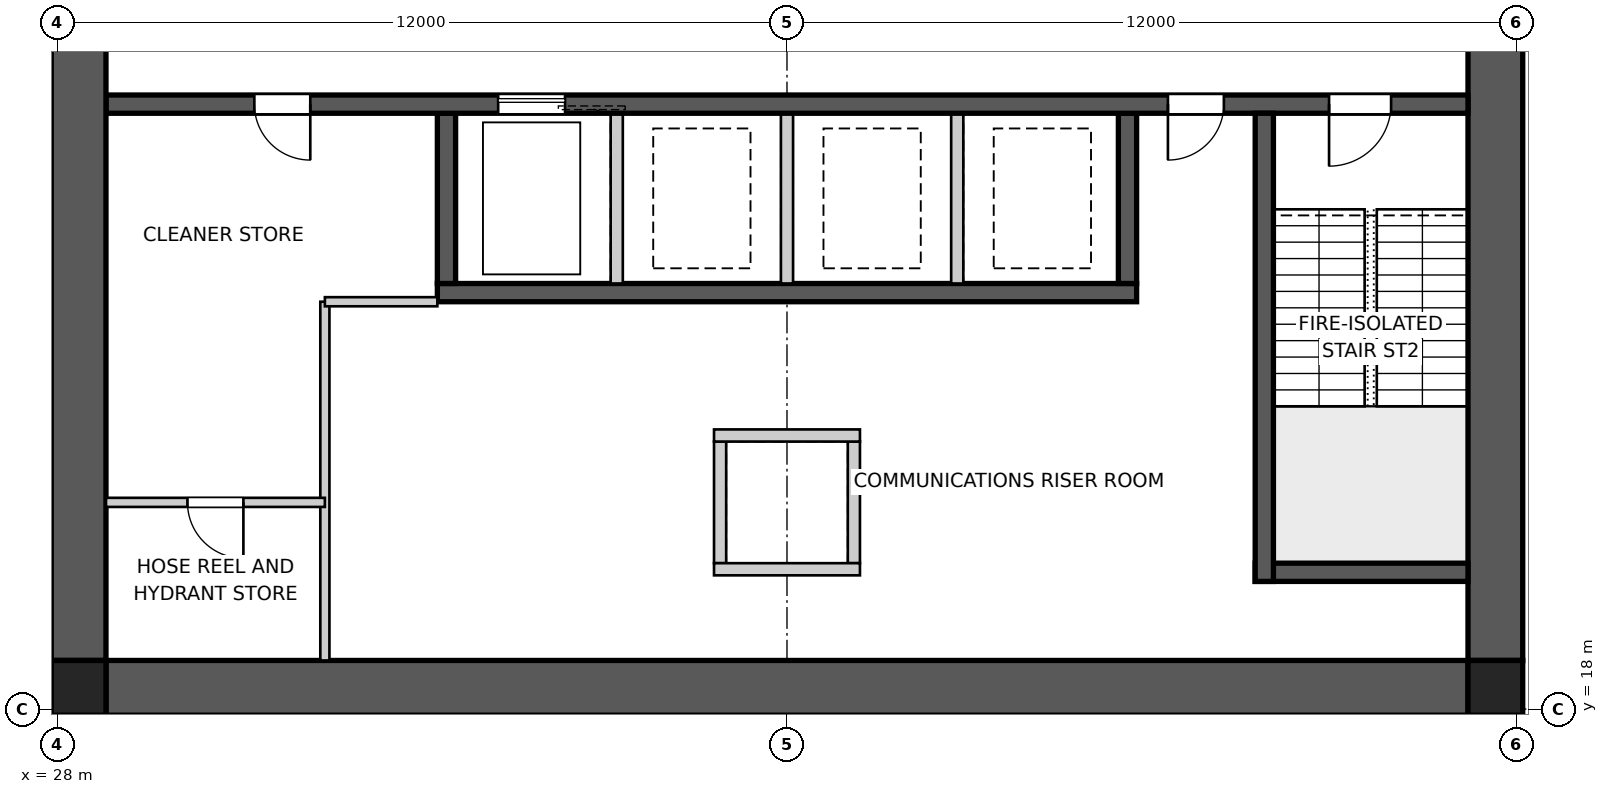
"""IFC4 building model, lengths in metres.
Left out: names, types, materials, properties, quantities, classifications, styles, units other than length and angle.
Written with IfcOpenShell. Run it as: python <this file> out.ifc"""

import sys

from ifc_helpers import new_model, si_unit, direction, frame, frame_2d, origin, origin_2d, place, context, subcontext, project, spatial, polyline, rectangle, outline, extrude, element, fill, save


model = new_model("IFC4")
c1 = context("Model", 3, precision=1e-05, world=origin(), true_north=direction((0.0, 1.0)))
c2 = subcontext(c1, "Body", "Model", "MODEL_VIEW")
j1 = project(units=[si_unit("LENGTHUNIT", "METRE"), si_unit("PLANEANGLEUNIT", "RADIAN")], contexts=[c1])
p1 = place(None, origin())
s1 = spatial("IfcSite", under=j1, at=p1, CompositionType="ELEMENT")
p2 = place(p1, origin())
s2 = spatial("IfcBuilding", under=s1, at=p2, CompositionType="ELEMENT")
p3 = place(p2, frame((0.0, 0.0, 6.0)))
s3 = spatial("IfcBuildingStorey", under=s2, at=p3, CompositionType="ELEMENT", Elevation=6.0)
p4 = place(p3, frame((51.2, 18.35, 0.0), z_axis=(0.0, 0.0, 1.0), x_axis=(-1.0, 0.0, 0.0)))
e1 = element("IfcWall", 1, at=p4, inside=s3, PredefinedType="SHEAR", context=c2, shape_type="SweptSolid", body=[
    extrude(outline(polyline([(0.0, -0.45), (22.4, -0.45), (22.4, -0.025), (22.85, -0.025), (22.85, 0.025), (22.4, 0.025), (22.4, 0.45), (0.0, 0.45), (0.0, 0.025), (-0.45, 0.025), (-0.45, -0.025), (0.0, -0.025), (0.0, -0.45)])), origin(), (0.0, 0.0, 1.0), 4.5),
])
p5 = place(p3, frame((51.65, 18.8, 0.0), z_axis=(0.0, 0.0, 1.0), x_axis=(0.0, 1.0, 0.0)))
e2 = element("IfcWall", 2, at=p5, inside=s3, PredefinedType="SHEAR", context=c2, shape_type="SweptSolid", body=[
    extrude(outline(polyline([(0.0, -0.45), (22.4, -0.45), (22.4, -0.025), (22.85, -0.025), (22.85, 0.025), (22.4, 0.025), (22.4, 0.45), (0.0, 0.45), (0.0, 0.025), (-0.45, 0.025), (-0.45, -0.025), (0.0, -0.025), (0.0, -0.45)])), origin(), (0.0, 0.0, 1.0), 4.5),
])
p6 = place(p5, frame((11.14, 0.0, 0.0)))
e3 = element("IfcOpeningElement", 3, at=p6, cuts=e2, PredefinedType="OPENING", context=c2, shape_type="SweptSolid", body=[
    extrude(rectangle(XDim=1.02, YDim=2.4, at=frame_2d((0.51, 1.2))), frame((0.0, 0.46, 0.0), z_axis=(0.0, -1.0, 0.0), x_axis=(1.0, 0.0, 0.0)), (0.0, 0.0, 1.0), 0.92),
])
p7 = place(p3, frame((28.35, 41.2, 0.0), z_axis=(0.0, 0.0, 1.0), x_axis=(0.0, -1.0, 0.0)))
e4 = element("IfcWall", 4, at=p7, inside=s3, PredefinedType="SHEAR", context=c2, shape_type="SweptSolid", body=[
    extrude(outline(polyline([(0.0, -0.45), (22.4, -0.45), (22.4, -0.025), (22.85, -0.025), (22.85, 0.025), (22.4, 0.025), (22.4, 0.45), (0.0, 0.45), (0.0, 0.025), (-0.45, 0.025), (-0.45, -0.025), (0.0, -0.025), (0.0, -0.45)])), origin(), (0.0, 0.0, 1.0), 4.5),
])
p8 = place(p7, frame((11.14, 0.0, 0.0)))
e5 = element("IfcOpeningElement", 5, at=p8, cuts=e4, PredefinedType="OPENING", context=c2, shape_type="SweptSolid", body=[
    extrude(rectangle(XDim=1.02, YDim=2.4, at=frame_2d((0.51, 1.2))), frame((0.0, 0.46, 0.0), z_axis=(0.0, -1.0, 0.0), x_axis=(1.0, 0.0, 0.0)), (0.0, 0.0, 1.0), 0.92),
])
p9 = place(p3, frame((51.2, 27.95, 0.0), z_axis=(0.0, 0.0, 1.0), x_axis=(-1.0, 0.0, 0.0)))
e6 = element("IfcWall", 6, at=p9, inside=s3, PredefinedType="SHEAR", context=c2, shape_type="SweptSolid", body=[
    extrude(rectangle(XDim=22.4, YDim=0.3, at=frame_2d((11.2, 0.0))), origin(), (0.0, 0.0, 1.0), 4.5),
])
p10 = place(p9, frame((19.04, 0.0, 0.0)))
e7 = element("IfcOpeningElement", 7, at=p10, cuts=e6, PredefinedType="OPENING", context=c2, shape_type="SweptSolid", body=[
    extrude(rectangle(XDim=0.92, YDim=2.1, at=frame_2d((0.46, 1.05))), frame((0.0, 0.16, 0.0), z_axis=(0.0, -1.0, 0.0), x_axis=(1.0, 0.0, 0.0)), (0.0, 0.0, 1.0), 0.32),
])
p11 = place(p9, frame((1.265, 0.0, 0.0)))
e8 = element("IfcOpeningElement", 8, at=p11, cuts=e6, PredefinedType="OPENING", context=c2, shape_type="SweptSolid", body=[
    extrude(rectangle(XDim=1.02, YDim=2.1, at=frame_2d((0.51, 1.05))), frame((0.0, 0.16, 0.0), z_axis=(0.0, -1.0, 0.0), x_axis=(1.0, 0.0, 0.0)), (0.0, 0.0, 1.0), 0.32),
])
p12 = place(p9, frame((4.015, 0.0, 0.0)))
e9 = element("IfcOpeningElement", 9, at=p12, cuts=e6, PredefinedType="OPENING", context=c2, shape_type="SweptSolid", body=[
    extrude(rectangle(XDim=0.92, YDim=2.1, at=frame_2d((0.46, 1.05))), frame((0.0, 0.16, 0.0), z_axis=(0.0, -1.0, 0.0), x_axis=(1.0, 0.0, 0.0)), (0.0, 0.0, 1.0), 0.32),
])
p13 = place(p9, frame((14.85, 0.0, 0.0)))
e10 = element("IfcOpeningElement", 10, at=p13, cuts=e6, PredefinedType="OPENING", context=c2, shape_type="SweptSolid", body=[
    extrude(rectangle(XDim=1.1, YDim=2.1, at=frame_2d((0.55, 1.05))), frame((0.0, 0.16, 0.0), z_axis=(0.0, -1.0, 0.0), x_axis=(1.0, 0.0, 0.0)), (0.0, 0.0, 1.0), 0.32),
])
p14 = place(p3, frame((45.75, 24.85, 0.0), z_axis=(0.0, 0.0, 1.0), x_axis=(-1.0, 0.0, 0.0)))
e11 = element("IfcWall", 11, at=p14, inside=s3, PredefinedType="SHEAR", context=c2, shape_type="SweptSolid", body=[
    extrude(rectangle(XDim=11.5, YDim=0.3, at=frame_2d((5.75, 0.0))), origin(), (0.0, 0.0, 1.0), 4.5),
])
p15 = place(p3, frame((45.6, 27.8, 0.0), z_axis=(0.0, 0.0, 1.0), x_axis=(0.0, -1.0, 0.0)))
e12 = element("IfcWall", 12, at=p15, inside=s3, PredefinedType="SHEAR", context=c2, shape_type="SweptSolid", body=[
    extrude(rectangle(XDim=2.8, YDim=0.3, at=frame_2d((1.4, 0.0))), origin(), (0.0, 0.0, 1.0), 4.5),
])
for number, where, z_axis, x_axis in (
    (13, (42.8, 27.8, 0.0), (0.0, 0.0, 1.0), (0.0, -1.0, 0.0)),
    (14, (40.0, 27.8, 0.0), (0.0, 0.0, 1.0), (0.0, -1.0, 0.0)),
    (15, (37.2, 27.8, 0.0), (0.0, 0.0, 1.0), (0.0, -1.0, 0.0)),
):
    element("IfcWall", number, at=place(p3, frame(where, z_axis=z_axis, x_axis=x_axis)), inside=s3, PredefinedType="SOLIDWALL", context=c2, shape_type="SweptSolid", body=[
        extrude(rectangle(XDim=2.8, YDim=0.2, at=frame_2d((1.4, 0.0))), origin(), (0.0, 0.0, 1.0), 4.5),
    ])
p16 = place(p3, frame((34.4, 27.8, 0.0), z_axis=(0.0, 0.0, 1.0), x_axis=(0.0, -1.0, 0.0)))
e16 = element("IfcWall", 16, at=p16, inside=s3, PredefinedType="SHEAR", context=c2, shape_type="SweptSolid", body=[
    extrude(rectangle(XDim=2.8, YDim=0.3, at=frame_2d((1.4, 0.0))), origin(), (0.0, 0.0, 1.0), 4.5),
])
p17 = place(p3, frame((47.85, 27.8, 0.0), z_axis=(0.0, 0.0, 1.0), x_axis=(0.0, -1.0, 0.0)))
e17 = element("IfcWall", 17, at=p17, inside=s3, PredefinedType="SHEAR", context=c2, shape_type="SweptSolid", body=[
    extrude(rectangle(XDim=7.7, YDim=0.3, at=frame_2d((3.85, 0.0))), origin(), (0.0, 0.0, 1.0), 4.5),
])
p18 = place(p3, frame((51.2, 20.25, 0.0), z_axis=(0.0, 0.0, 1.0), x_axis=(-1.0, 0.0, 0.0)))
e18 = element("IfcWall", 18, at=p18, inside=s3, PredefinedType="SHEAR", context=c2, shape_type="SweptSolid", body=[
    extrude(rectangle(XDim=3.5, YDim=0.3, at=frame_2d((1.75, 0.0))), origin(), (0.0, 0.0, 1.0), 4.5),
])
for number, where, z_axis, x_axis in (
    (19, (38.9, 22.4, 0.0), (0.0, 0.0, 1.0), (0.0, -1.0, 0.0)),
    (20, (41.1, 22.4, 0.0), (0.0, 0.0, 1.0), (0.0, -1.0, 0.0)),
):
    element("IfcWall", number, at=place(p3, frame(where, z_axis=z_axis, x_axis=x_axis)), inside=s3, PredefinedType="SOLIDWALL", context=c2, shape_type="SweptSolid", body=[
        extrude(rectangle(XDim=2.0, YDim=0.2, at=frame_2d((1.0, 0.0))), origin(), (0.0, 0.0, 1.0), 4.5),
    ])
for number, where, z_axis, x_axis in (
    (21, (38.8, 22.5, 0.0), (0.0, 0.0, 1.0), (1.0, 0.0, 0.0)),
    (22, (38.8, 20.3, 0.0), (0.0, 0.0, 1.0), (1.0, 0.0, 0.0)),
):
    element("IfcWall", number, at=place(p3, frame(where, z_axis=z_axis, x_axis=x_axis)), inside=s3, PredefinedType="SOLIDWALL", context=c2, shape_type="SweptSolid", body=[
        extrude(rectangle(XDim=2.4, YDim=0.2, at=frame_2d((1.2, 0.0))), origin(), (0.0, 0.0, 1.0), 4.5),
    ])
for number, where, z_axis, x_axis in (
    (23, (28.35, 18.35, 0.0), (0.0, 0.0, 1.0), (1.0, 0.0, 0.0)),
    (24, (51.65, 18.35, 0.0), (0.0, 0.0, 1.0), (1.0, 0.0, 0.0)),
):
    element("IfcColumn", number, at=place(p3, frame(where, z_axis=z_axis, x_axis=x_axis)), inside=s3, PredefinedType="COLUMN", context=c2, shape_type="SweptSolid", body=[
        extrude(rectangle(XDim=0.9, YDim=0.9, at=origin_2d()), origin(), (0.0, 0.0, 1.0), 4.5),
    ])
p19 = place(p3, frame((32.4, 18.8, 0.0), z_axis=(0.0, 0.0, 1.0), x_axis=(0.0, 1.0, 0.0)))
e25 = element("IfcWall", 25, at=p19, inside=s3, PredefinedType="SOLIDWALL", context=c2, shape_type="SweptSolid", body=[
    extrude(rectangle(XDim=5.9, YDim=0.15, at=frame_2d((2.95, 0.0))), origin(), (0.0, 0.0, 1.0), 4.15),
])
p20 = place(p3, frame((32.4, 24.7, 0.0), z_axis=(0.0, 0.0, 1.0), x_axis=(1.0, 0.0, 0.0)))
e26 = element("IfcWall", 26, at=p20, inside=s3, PredefinedType="SOLIDWALL", context=c2, shape_type="SweptSolid", body=[
    extrude(rectangle(XDim=1.85, YDim=0.15, at=frame_2d((0.925, 0.0))), origin(), (0.0, 0.0, 1.0), 4.15),
])
p21 = place(p3, frame((32.4, 21.4, 0.0), z_axis=(0.0, 0.0, 1.0), x_axis=(-1.0, 0.0, 0.0)))
e27 = element("IfcWall", 27, at=p21, inside=s3, PredefinedType="SOLIDWALL", context=c2, shape_type="SweptSolid", body=[
    extrude(rectangle(XDim=3.6, YDim=0.15, at=frame_2d((1.8, 0.0))), origin(), (0.0, 0.0, 1.0), 4.15),
])
p22 = place(p21, frame((1.34, 0.0, 0.0)))
e28 = element("IfcOpeningElement", 28, at=p22, cuts=e27, PredefinedType="OPENING", context=c2, shape_type="SweptSolid", body=[
    extrude(rectangle(XDim=0.92, YDim=2.1, at=frame_2d((0.46, 1.05))), frame((0.0, 0.085, 0.0), z_axis=(0.0, -1.0, 0.0), x_axis=(1.0, 0.0, 0.0)), (0.0, 0.0, 1.0), 0.17),
])
p23 = place(p10, origin())
e29 = element("IfcDoor", 29, at=p23, inside=s3, OperationType="SINGLE_SWING_LEFT", PredefinedType="DOOR", context=c2, shape_type="SweptSolid", body=[
    extrude(rectangle(XDim=0.92, YDim=2.1, at=frame_2d((0.46, 1.05))), frame((0.0, 0.025, 0.0), z_axis=(0.0, -1.0, 0.0), x_axis=(1.0, 0.0, 0.0)), (0.0, 0.0, 1.0), 0.05),
])
fill(e7, e29)
p24 = place(p11, origin())
e30 = element("IfcDoor", 30, at=p24, inside=s3, OperationType="SINGLE_SWING_RIGHT", PredefinedType="DOOR", context=c2, shape_type="SweptSolid", body=[
    extrude(rectangle(XDim=1.02, YDim=2.1, at=frame_2d((0.51, 1.05))), frame((0.0, 0.025, 0.0), z_axis=(0.0, -1.0, 0.0), x_axis=(1.0, 0.0, 0.0)), (0.0, 0.0, 1.0), 0.05),
])
fill(e8, e30)
p25 = place(p12, origin())
e31 = element("IfcDoor", 31, at=p25, inside=s3, OperationType="SINGLE_SWING_RIGHT", PredefinedType="DOOR", context=c2, shape_type="SweptSolid", body=[
    extrude(rectangle(XDim=0.92, YDim=2.1, at=frame_2d((0.46, 1.05))), frame((0.0, 0.025, 0.0), z_axis=(0.0, -1.0, 0.0), x_axis=(1.0, 0.0, 0.0)), (0.0, 0.0, 1.0), 0.05),
])
fill(e9, e31)
p26 = place(p22, origin())
e32 = element("IfcDoor", 32, at=p26, inside=s3, OperationType="SINGLE_SWING_LEFT", PredefinedType="DOOR", context=c2, shape_type="SweptSolid", body=[
    extrude(rectangle(XDim=0.92, YDim=2.1, at=frame_2d((0.46, 1.05))), frame((0.0, 0.025, 0.0), z_axis=(0.0, -1.0, 0.0), x_axis=(1.0, 0.0, 0.0)), (0.0, 0.0, 1.0), 0.05),
])
fill(e28, e32)
p27 = place(p13, origin())
e33 = element("IfcDoor", 33, at=p27, inside=s3, OperationType="SLIDING_TO_LEFT", PredefinedType="DOOR", context=c2, shape_type="SweptSolid", body=[
    extrude(rectangle(XDim=1.1, YDim=2.1, at=frame_2d((0.55, 1.05))), frame((0.0, 0.025, 0.0), z_axis=(0.0, -1.0, 0.0), x_axis=(1.0, 0.0, 0.0)), (0.0, 0.0, 1.0), 0.05),
])
fill(e10, e33)
save(model, sys.argv[1])
